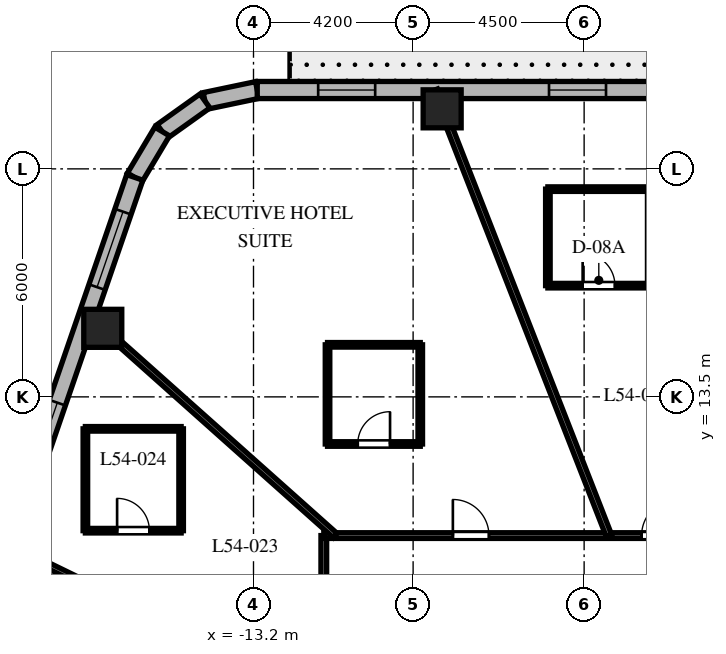
"""IFC4 building model, lengths in metres.
Left out: names, types, materials, properties, quantities, classifications, styles, units other than length and angle.
Written with IfcOpenShell. Run it as: python <this file> out.ifc"""

import sys

from ifc_helpers import new_model, si_unit, direction, frame, frame_2d, origin, origin_2d, place, context, subcontext, project, spatial, rectangle, extrude, element, fill, save


model = new_model("IFC4")
c1 = context("Model", 3, precision=1e-05, world=origin(), true_north=direction((0.0, 1.0)))
c2 = subcontext(c1, "Body", "Model", "MODEL_VIEW")
j1 = project(units=[si_unit("LENGTHUNIT", "METRE"), si_unit("PLANEANGLEUNIT", "RADIAN")], contexts=[c1])
p1 = place(None, origin())
s1 = spatial("IfcSite", under=j1, at=p1, CompositionType="ELEMENT")
p2 = place(p1, origin())
s2 = spatial("IfcBuilding", under=s1, at=p2, CompositionType="ELEMENT")
p3 = place(p2, frame((0.0, 0.0, 217.9)))
s3 = spatial("IfcBuildingStorey", under=s2, at=p3, CompositionType="ELEMENT", Elevation=217.9)
for number, where, z_axis, x_axis in (
    (1, (-8.236, 21.08, 0.0), (0.0, 0.0, 1.0), (1.0, 0.0, 0.0)),
    (2, (-17.166, 15.304, 0.0), (0.0, 0.0, 1.0), (1.0, 0.0, 0.0)),
):
    element("IfcColumn", number, at=place(p3, frame(where, z_axis=z_axis, x_axis=x_axis)), inside=s3, PredefinedType="COLUMN", context=c2, shape_type="SweptSolid", body=[
        extrude(rectangle(XDim=1.0, YDim=1.0, at=origin_2d()), origin(), (0.0, 0.0, 1.0), 3.8),
    ])
p4 = place(p3, frame((-13.102, 21.575, 0.0), z_axis=(0.0, 0.0, 1.0), x_axis=(-0.978757421505, -0.205021730188, 0.0)))
e3 = element("IfcWall", 3, at=p4, inside=s3, PredefinedType="SOLIDWALL", context=c2, shape_type="SweptSolid", body=[
    extrude(rectangle(XDim=1.406, YDim=0.45, at=frame_2d((0.703, 0.0))), origin(), (0.0, 0.0, 1.0), 3.5),
])
p5 = place(p3, frame((-14.478, 21.287, 0.0), z_axis=(0.0, 0.0, 1.0), x_axis=(-0.813888518617, -0.58102106611, 0.0)))
e4 = element("IfcWall", 4, at=p5, inside=s3, PredefinedType="SOLIDWALL", context=c2, shape_type="SweptSolid", body=[
    extrude(rectangle(XDim=1.383, YDim=0.45, at=frame_2d((0.691, 0.0))), origin(), (0.0, 0.0, 1.0), 3.5),
])
p6 = place(p3, frame((-15.604, 20.483, 0.0), z_axis=(0.0, 0.0, 1.0), x_axis=(-0.512222149036, -0.858852996756, 0.0)))
e5 = element("IfcWall", 5, at=p6, inside=s3, PredefinedType="SOLIDWALL", context=c2, shape_type="SweptSolid", body=[
    extrude(rectangle(XDim=1.406, YDim=0.45, at=frame_2d((0.703, 0.0))), origin(), (0.0, 0.0, 1.0), 3.5),
])
p7 = place(p3, frame((11.298, 21.575, 0.0), z_axis=(0.0, 0.0, 1.0), x_axis=(-1.0, 0.0, 0.0)))
e6 = element("IfcWall", 6, at=p7, inside=s3, PredefinedType="SOLIDWALL", context=c2, shape_type="SweptSolid", body=[
    extrude(rectangle(XDim=24.399, YDim=0.45, at=frame_2d((12.2, 0.0))), origin(), (0.0, 0.0, 1.0), 3.5),
])
p8 = place(p7, frame((2.55, 0.0, 0.0)))
e7 = element("IfcOpeningElement", 7, at=p8, cuts=e6, PredefinedType="OPENING", context=c2, shape_type="SweptSolid", body=[
    extrude(rectangle(XDim=0.95, YDim=2.15, at=frame_2d((0.475, 1.075))), frame((0.0, 0.235, 0.0), z_axis=(0.0, -1.0, 0.0), x_axis=(1.0, 0.0, 0.0)), (0.0, 0.0, 1.0), 0.47),
])
p9 = place(p7, frame((8.469, 0.0, 0.8)))
e8 = element("IfcOpeningElement", 8, at=p9, cuts=e6, PredefinedType="OPENING", context=c2, shape_type="SweptSolid", body=[
    extrude(rectangle(XDim=1.5, YDim=1.8, at=frame_2d((0.75, 0.9))), frame((0.0, 0.235, 0.0), z_axis=(0.0, -1.0, 0.0), x_axis=(1.0, 0.0, 0.0)), (0.0, 0.0, 1.0), 0.47),
])
p10 = place(p7, frame((15.222, 0.0, 0.8)))
e9 = element("IfcOpeningElement", 9, at=p10, cuts=e6, PredefinedType="OPENING", context=c2, shape_type="SweptSolid", body=[
    extrude(rectangle(XDim=1.5, YDim=1.8, at=frame_2d((0.75, 0.9))), frame((0.0, 0.235, 0.0), z_axis=(0.0, -1.0, 0.0), x_axis=(1.0, 0.0, 0.0)), (0.0, 0.0, 1.0), 0.47),
])
p11 = place(p7, frame((21.296, 0.0, 0.8)))
e10 = element("IfcOpeningElement", 10, at=p11, cuts=e6, PredefinedType="OPENING", context=c2, shape_type="SweptSolid", body=[
    extrude(rectangle(XDim=1.5, YDim=1.8, at=frame_2d((0.75, 0.9))), frame((0.0, 0.235, 0.0), z_axis=(0.0, -1.0, 0.0), x_axis=(1.0, 0.0, 0.0)), (0.0, 0.0, 1.0), 0.47),
])
p12 = place(p3, frame((-16.324, 19.275, 0.0), z_axis=(0.0, 0.0, 1.0), x_axis=(-0.325083142304, -0.945685439557, 0.0)))
e11 = element("IfcWall", 11, at=p12, inside=s3, PredefinedType="SOLIDWALL", context=c2, shape_type="SweptSolid", body=[
    extrude(rectangle(XDim=20.224, YDim=0.45, at=frame_2d((10.112, 0.0))), origin(), (0.0, 0.0, 1.0), 3.5),
])
p13 = place(p12, frame((0.953, 0.0, 0.8)))
e12 = element("IfcOpeningElement", 12, at=p13, cuts=e11, PredefinedType="OPENING", context=c2, shape_type="SweptSolid", body=[
    extrude(rectangle(XDim=2.1, YDim=1.85, at=frame_2d((1.05, 0.925))), frame((0.0, 0.235, 0.0), z_axis=(0.0, -1.0, 0.0), x_axis=(1.0, 0.0, 0.0)), (0.0, 0.0, 1.0), 0.47),
])
p14 = place(p12, frame((6.268, 0.0, 0.8)))
e13 = element("IfcOpeningElement", 13, at=p14, cuts=e11, PredefinedType="OPENING", context=c2, shape_type="SweptSolid", body=[
    extrude(rectangle(XDim=2.1, YDim=1.85, at=frame_2d((1.05, 0.925))), frame((0.0, 0.235, 0.0), z_axis=(0.0, -1.0, 0.0), x_axis=(1.0, 0.0, 0.0)), (0.0, 0.0, 1.0), 0.47),
])
p15 = place(p12, frame((11.95, 0.0, 0.8)))
e14 = element("IfcOpeningElement", 14, at=p15, cuts=e11, PredefinedType="OPENING", context=c2, shape_type="SweptSolid", body=[
    extrude(rectangle(XDim=2.1, YDim=1.85, at=frame_2d((1.05, 0.925))), frame((0.0, 0.235, 0.0), z_axis=(0.0, -1.0, 0.0), x_axis=(1.0, 0.0, 0.0)), (0.0, 0.0, 1.0), 0.47),
])
p16 = place(p12, frame((17.118, 0.0, 0.8)))
e15 = element("IfcOpeningElement", 15, at=p16, cuts=e11, PredefinedType="OPENING", context=c2, shape_type="SweptSolid", body=[
    extrude(rectangle(XDim=2.1, YDim=1.85, at=frame_2d((1.05, 0.925))), frame((0.0, 0.235, 0.0), z_axis=(0.0, -1.0, 0.0), x_axis=(1.0, 0.0, 0.0)), (0.0, 0.0, 1.0), 0.47),
])
p17 = place(p3, frame((-11.35, 4.4, 0.0), z_axis=(0.0, 0.0, 1.0), x_axis=(0.0, 1.0, 0.0)))
e16 = element("IfcWall", 16, at=p17, inside=s3, PredefinedType="PARTITIONING", context=c2, shape_type="SweptSolid", body=[
    extrude(rectangle(XDim=5.45, YDim=0.15, at=frame_2d((2.725, 0.0))), origin(), (0.0, 0.0, 1.0), 2.99),
])
p18 = place(p17, frame((2.694, 0.0, 0.0)))
e17 = element("IfcOpeningElement", 17, at=p18, cuts=e16, PredefinedType="OPENING", context=c2, shape_type="SweptSolid", body=[
    extrude(rectangle(XDim=0.95, YDim=2.03, at=frame_2d((0.475, 1.015))), frame((0.0, 0.085, 0.0), z_axis=(0.0, -1.0, 0.0), x_axis=(1.0, 0.0, 0.0)), (0.0, 0.0, 1.0), 0.17),
])
p19 = place(p3, frame((-11.35, 9.85, 0.0), z_axis=(0.0, 0.0, 1.0), x_axis=(1.0, 0.0, 0.0)))
e18 = element("IfcWall", 18, at=p19, inside=s3, PredefinedType="PARTITIONING", context=c2, shape_type="SweptSolid", body=[
    extrude(rectangle(XDim=10.43, YDim=0.15, at=frame_2d((5.215, 0.0))), origin(), (0.0, 0.0, 1.0), 2.99),
])
p20 = place(p19, frame((8.362, 0.0, 0.0)))
e19 = element("IfcOpeningElement", 19, at=p20, cuts=e18, PredefinedType="OPENING", context=c2, shape_type="SweptSolid", body=[
    extrude(rectangle(XDim=0.95, YDim=2.03, at=frame_2d((0.475, 1.015))), frame((0.0, 0.085, 0.0), z_axis=(0.0, -1.0, 0.0), x_axis=(1.0, 0.0, 0.0)), (0.0, 0.0, 1.0), 0.17),
])
p21 = place(p19, frame((3.396, 0.0, 0.0)))
e20 = element("IfcOpeningElement", 20, at=p21, cuts=e18, PredefinedType="OPENING", context=c2, shape_type="SweptSolid", body=[
    extrude(rectangle(XDim=0.95, YDim=2.03, at=frame_2d((0.475, 1.015))), frame((0.0, 0.085, 0.0), z_axis=(0.0, -1.0, 0.0), x_axis=(1.0, 0.0, 0.0)), (0.0, 0.0, 1.0), 0.17),
])
p22 = place(p3, frame((-3.848, 9.85, 0.0), z_axis=(0.0, 0.0, 1.0), x_axis=(-0.363921778212, 0.931429513889, 0.0)))
e21 = element("IfcWall", 21, at=p22, inside=s3, PredefinedType="PARTITIONING", context=c2, shape_type="SweptSolid", body=[
    extrude(rectangle(XDim=12.588, YDim=0.15, at=frame_2d((6.294, 0.0))), origin(), (0.0, 0.0, 1.0), 2.74),
])
p23 = place(p3, frame((-11.048, 9.85, 0.0), z_axis=(0.0, 0.0, 1.0), x_axis=(-0.746444434655, 0.665447748492, 0.0)))
e22 = element("IfcWall", 22, at=p23, inside=s3, PredefinedType="PARTITIONING", context=c2, shape_type="SweptSolid", body=[
    extrude(rectangle(XDim=8.732, YDim=0.15, at=frame_2d((4.366, 0.0))), origin(), (0.0, 0.0, 1.0), 2.74),
])
p24 = place(p3, frame((-11.35, 5.528, 0.0), z_axis=(0.0, 0.0, 1.0), x_axis=(-0.899038669565, 0.437869239188, 0.0)))
e23 = element("IfcWall", 23, at=p24, inside=s3, PredefinedType="PARTITIONING", context=c2, shape_type="SweptSolid", body=[
    extrude(rectangle(XDim=9.242, YDim=0.15, at=frame_2d((4.621, 0.0))), origin(), (0.0, 0.0, 1.0), 2.74),
])
p25 = place(p3, frame((-5.454, 16.427, 0.0), z_axis=(0.0, 0.0, 1.0), x_axis=(1.0, 0.0, 0.0)))
e24 = element("IfcWall", 24, at=p25, inside=s3, PredefinedType="PARTITIONING", context=c2, shape_type="SweptSolid", body=[
    extrude(rectangle(XDim=2.68, YDim=0.12, at=frame_2d((1.34, 0.0))), origin(), (0.0, 0.0, 1.0), 3.5),
])
p26 = place(p25, frame((0.915, 0.0, 0.0)))
e25 = element("IfcOpeningElement", 25, at=p26, cuts=e24, PredefinedType="OPENING", context=c2, shape_type="SweptSolid", body=[
    extrude(rectangle(XDim=0.85, YDim=2.03, at=frame_2d((0.425, 1.015))), frame((0.0, 0.07, 0.0), z_axis=(0.0, -1.0, 0.0), x_axis=(1.0, 0.0, 0.0)), (0.0, 0.0, 1.0), 0.14),
])
p27 = place(p3, frame((-2.774, 18.967, 0.0), z_axis=(0.0, 0.0, 1.0), x_axis=(-1.0, 0.0, 0.0)))
e26 = element("IfcWall", 26, at=p27, inside=s3, PredefinedType="PARTITIONING", context=c2, shape_type="SweptSolid", body=[
    extrude(rectangle(XDim=2.68, YDim=0.12, at=frame_2d((1.34, 0.0))), origin(), (0.0, 0.0, 1.0), 3.5),
])
p28 = place(p3, frame((-5.454, 18.967, 0.0), z_axis=(0.0, 0.0, 1.0), x_axis=(0.0, -1.0, 0.0)))
e27 = element("IfcWall", 27, at=p28, inside=s3, PredefinedType="PARTITIONING", context=c2, shape_type="SweptSolid", body=[
    extrude(rectangle(XDim=2.54, YDim=0.12, at=frame_2d((1.27, 0.0))), origin(), (0.0, 0.0, 1.0), 2.941),
])
p29 = place(p3, frame((-11.252, 12.26, 0.0), z_axis=(0.0, 0.0, 1.0), x_axis=(1.0, 0.0, 0.0)))
e28 = element("IfcWall", 28, at=p29, inside=s3, PredefinedType="PARTITIONING", context=c2, shape_type="SweptSolid", body=[
    extrude(rectangle(XDim=2.44, YDim=0.12, at=frame_2d((1.22, 0.0))), origin(), (0.0, 0.0, 1.0), 3.073),
])
p30 = place(p29, frame((0.795, 0.0, 0.0)))
e29 = element("IfcOpeningElement", 29, at=p30, cuts=e28, PredefinedType="OPENING", context=c2, shape_type="SweptSolid", body=[
    extrude(rectangle(XDim=0.85, YDim=2.03, at=frame_2d((0.425, 1.015))), frame((0.0, 0.07, 0.0), z_axis=(0.0, -1.0, 0.0), x_axis=(1.0, 0.0, 0.0)), (0.0, 0.0, 1.0), 0.14),
])
p31 = place(p3, frame((-8.812, 12.26, 0.0), z_axis=(0.0, 0.0, 1.0), x_axis=(0.0, 1.0, 0.0)))
e30 = element("IfcWall", 30, at=p31, inside=s3, PredefinedType="PARTITIONING", context=c2, shape_type="SweptSolid", body=[
    extrude(rectangle(XDim=2.61, YDim=0.12, at=frame_2d((1.305, 0.0))), origin(), (0.0, 0.0, 1.0), 2.99),
])
p32 = place(p3, frame((-8.812, 14.87, 0.0), z_axis=(0.0, 0.0, 1.0), x_axis=(-1.0, 0.0, 0.0)))
e31 = element("IfcWall", 31, at=p32, inside=s3, PredefinedType="PARTITIONING", context=c2, shape_type="SweptSolid", body=[
    extrude(rectangle(XDim=2.44, YDim=0.12, at=frame_2d((1.22, 0.0))), origin(), (0.0, 0.0, 1.0), 3.027),
])
p33 = place(p3, frame((-11.252, 14.87, 0.0), z_axis=(0.0, 0.0, 1.0), x_axis=(0.0, -1.0, 0.0)))
e32 = element("IfcWall", 32, at=p33, inside=s3, PredefinedType="PARTITIONING", context=c2, shape_type="SweptSolid", body=[
    extrude(rectangle(XDim=2.61, YDim=0.12, at=frame_2d((1.305, 0.0))), origin(), (0.0, 0.0, 1.0), 3.027),
])
p34 = place(p3, frame((-17.624, 9.979, 0.0), z_axis=(0.0, 0.0, 1.0), x_axis=(1.0, 0.0, 0.0)))
e33 = element("IfcWall", 33, at=p34, inside=s3, PredefinedType="PARTITIONING", context=c2, shape_type="SweptSolid", body=[
    extrude(rectangle(XDim=2.52, YDim=0.12, at=frame_2d((1.26, 0.0))), origin(), (0.0, 0.0, 1.0), 3.073),
])
p35 = place(p34, frame((0.835, 0.0, 0.0)))
e34 = element("IfcOpeningElement", 34, at=p35, cuts=e33, PredefinedType="OPENING", context=c2, shape_type="SweptSolid", body=[
    extrude(rectangle(XDim=0.85, YDim=2.03, at=frame_2d((0.425, 1.015))), frame((0.0, 0.07, 0.0), z_axis=(0.0, -1.0, 0.0), x_axis=(1.0, 0.0, 0.0)), (0.0, 0.0, 1.0), 0.14),
])
p36 = place(p3, frame((-15.104, 9.979, 0.0), z_axis=(0.0, 0.0, 1.0), x_axis=(0.0, 1.0, 0.0)))
e35 = element("IfcWall", 35, at=p36, inside=s3, PredefinedType="PARTITIONING", context=c2, shape_type="SweptSolid", body=[
    extrude(rectangle(XDim=2.68, YDim=0.12, at=frame_2d((1.34, 0.0))), origin(), (0.0, 0.0, 1.0), 3.073),
])
p37 = place(p3, frame((-15.104, 12.659, 0.0), z_axis=(0.0, 0.0, 1.0), x_axis=(-1.0, 0.0, 0.0)))
e36 = element("IfcWall", 36, at=p37, inside=s3, PredefinedType="PARTITIONING", context=c2, shape_type="SweptSolid", body=[
    extrude(rectangle(XDim=2.52, YDim=0.12, at=frame_2d((1.26, 0.0))), origin(), (0.0, 0.0, 1.0), 3.5),
])
p38 = place(p3, frame((-17.624, 12.659, 0.0), z_axis=(0.0, 0.0, 1.0), x_axis=(0.0, -1.0, 0.0)))
e37 = element("IfcWall", 37, at=p38, inside=s3, PredefinedType="PARTITIONING", context=c2, shape_type="SweptSolid", body=[
    extrude(rectangle(XDim=2.68, YDim=0.12, at=frame_2d((1.34, 0.0))), origin(), (0.0, 0.0, 1.0), 3.5),
])
p39 = place(p10, origin())
e38 = element("IfcWindow", 38, at=p39, inside=s3, PartitioningType="SINGLE_PANEL", PredefinedType="WINDOW", context=c2, shape_type="SweptSolid", body=[
    extrude(rectangle(XDim=1.5, YDim=1.8, at=frame_2d((0.75, 0.9))), frame((0.0, 0.03, 0.0), z_axis=(0.0, -1.0, 0.0), x_axis=(1.0, 0.0, 0.0)), (0.0, 0.0, 1.0), 0.06),
])
fill(e9, e38)
p40 = place(p11, origin())
e39 = element("IfcWindow", 39, at=p40, inside=s3, PartitioningType="SINGLE_PANEL", PredefinedType="WINDOW", context=c2, shape_type="SweptSolid", body=[
    extrude(rectangle(XDim=1.5, YDim=1.8, at=frame_2d((0.75, 0.9))), frame((0.0, 0.03, 0.0), z_axis=(0.0, -1.0, 0.0), x_axis=(1.0, 0.0, 0.0)), (0.0, 0.0, 1.0), 0.06),
])
fill(e10, e39)
p41 = place(p13, origin())
e40 = element("IfcWindow", 40, at=p41, inside=s3, PartitioningType="SINGLE_PANEL", PredefinedType="WINDOW", context=c2, shape_type="SweptSolid", body=[
    extrude(rectangle(XDim=2.1, YDim=1.85, at=frame_2d((1.05, 0.925))), frame((0.0, 0.03, 0.0), z_axis=(0.0, -1.0, 0.0), x_axis=(1.0, 0.0, 0.0)), (0.0, 0.0, 1.0), 0.06),
])
fill(e12, e40)
p42 = place(p14, origin())
e41 = element("IfcWindow", 41, at=p42, inside=s3, PartitioningType="SINGLE_PANEL", PredefinedType="WINDOW", context=c2, shape_type="SweptSolid", body=[
    extrude(rectangle(XDim=2.1, YDim=1.85, at=frame_2d((1.05, 0.925))), frame((0.0, 0.03, 0.0), z_axis=(0.0, -1.0, 0.0), x_axis=(1.0, 0.0, 0.0)), (0.0, 0.0, 1.0), 0.06),
])
fill(e13, e41)
p43 = place(p20, origin())
e42 = element("IfcDoor", 42, at=p43, inside=s3, OperationType="SINGLE_SWING_RIGHT", PredefinedType="DOOR", context=c2, shape_type="SweptSolid", body=[
    extrude(rectangle(XDim=0.95, YDim=2.03, at=frame_2d((0.475, 1.015))), frame((0.0, 0.025, 0.0), z_axis=(0.0, -1.0, 0.0), x_axis=(1.0, 0.0, 0.0)), (0.0, 0.0, 1.0), 0.05),
])
fill(e19, e42)
p44 = place(p26, origin())
e43 = element("IfcDoor", 43, at=p44, inside=s3, OperationType="SINGLE_SWING_LEFT", PredefinedType="DOOR", context=c2, shape_type="SweptSolid", body=[
    extrude(rectangle(XDim=0.85, YDim=2.03, at=frame_2d((0.425, 1.015))), frame((0.0, 0.025, 0.0), z_axis=(0.0, -1.0, 0.0), x_axis=(1.0, 0.0, 0.0)), (0.0, 0.0, 1.0), 0.05),
])
fill(e25, e43)
p45 = place(p21, origin())
e44 = element("IfcDoor", 44, at=p45, inside=s3, OperationType="SINGLE_SWING_LEFT", PredefinedType="DOOR", context=c2, shape_type="SweptSolid", body=[
    extrude(rectangle(XDim=0.95, YDim=2.03, at=frame_2d((0.475, 1.015))), frame((0.0, 0.025, 0.0), z_axis=(0.0, -1.0, 0.0), x_axis=(1.0, 0.0, 0.0)), (0.0, 0.0, 1.0), 0.05),
])
fill(e20, e44)
p46 = place(p30, origin())
e45 = element("IfcDoor", 45, at=p46, inside=s3, OperationType="SINGLE_SWING_RIGHT", PredefinedType="DOOR", context=c2, shape_type="SweptSolid", body=[
    extrude(rectangle(XDim=0.85, YDim=2.03, at=frame_2d((0.425, 1.015))), frame((0.0, 0.025, 0.0), z_axis=(0.0, -1.0, 0.0), x_axis=(1.0, 0.0, 0.0)), (0.0, 0.0, 1.0), 0.05),
])
fill(e29, e45)
p47 = place(p35, origin())
e46 = element("IfcDoor", 46, at=p47, inside=s3, OperationType="SINGLE_SWING_LEFT", PredefinedType="DOOR", context=c2, shape_type="SweptSolid", body=[
    extrude(rectangle(XDim=0.85, YDim=2.03, at=frame_2d((0.425, 1.015))), frame((0.0, 0.025, 0.0), z_axis=(0.0, -1.0, 0.0), x_axis=(1.0, 0.0, 0.0)), (0.0, 0.0, 1.0), 0.05),
])
fill(e34, e46)
save(model, sys.argv[1])
